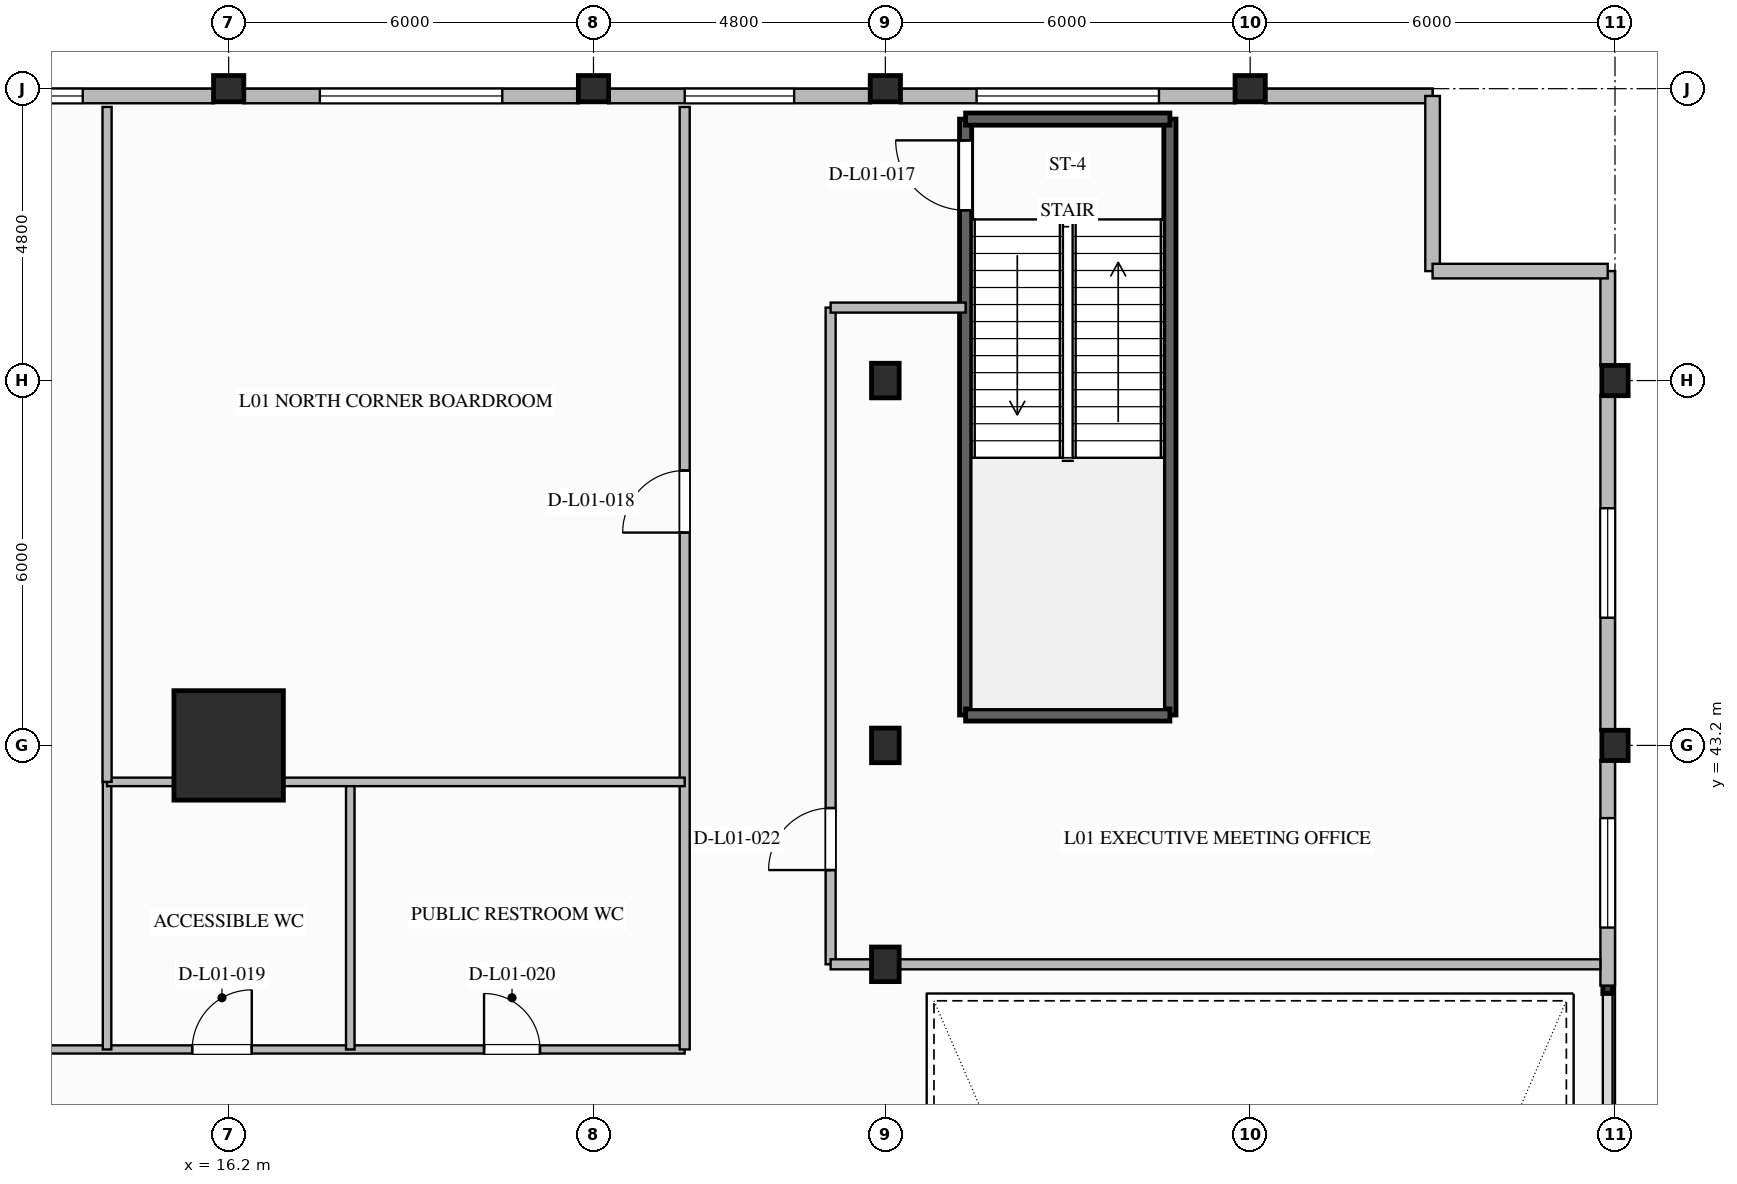
"""IFC4 building model, lengths in metres.
Left out: names, types, materials, properties, quantities, classifications, styles, units other than length and angle.
Written with IfcOpenShell. Run it as: python <this file> out.ifc"""

import sys

from ifc_helpers import new_model, si_unit, direction, frame, frame_2d, origin, origin_2d, place, context, subcontext, project, spatial, rectangle, i_section, extrude, element, fill, save


model = new_model("IFC4")
c1 = context("Model", 3, precision=1e-05, world=origin(), true_north=direction((0.0, 1.0)))
c2 = subcontext(c1, "Body", "Model", "MODEL_VIEW")
j1 = project(units=[si_unit("LENGTHUNIT", "METRE"), si_unit("PLANEANGLEUNIT", "RADIAN")], contexts=[c1])
p1 = place(None, origin())
s1 = spatial("IfcSite", under=j1, at=p1, CompositionType="ELEMENT")
p2 = place(p1, origin())
s2 = spatial("IfcBuilding", under=s1, at=p2, CompositionType="ELEMENT")
p3 = place(p2, frame((0.0, 0.0, 5.6)))
s3 = spatial("IfcBuildingStorey", under=s2, at=p3, CompositionType="ELEMENT", Elevation=5.6)
p4 = place(p3, frame((16.2, 43.2, 0.0), z_axis=(0.0, 0.0, 1.0), x_axis=(1.0, 0.0, 0.0)))
e1 = element("IfcColumn", 1, at=p4, inside=s3, PredefinedType="COLUMN", context=c2, shape_type="SweptSolid", body=[
    extrude(rectangle(XDim=1.8, YDim=1.8, at=origin_2d()), origin(), (0.0, 0.0, 1.0), 5.2),
])
for number, where, z_axis, x_axis in (
    (2, (39.0, 43.2, 0.0), (0.0, 0.0, 1.0), (1.0, 0.0, 0.0)),
    (3, (39.0, 49.2, 0.0), (0.0, 0.0, 1.0), (1.0, 0.0, 0.0)),
    (4, (16.2, 54.0, 0.0), (0.0, 0.0, 1.0), (0.0, 1.0, 0.0)),
    (5, (22.2, 54.0, 0.0), (0.0, 0.0, 1.0), (0.0, 1.0, 0.0)),
    (6, (27.0, 54.0, 0.0), (0.0, 0.0, 1.0), (0.0, 1.0, 0.0)),
    (7, (33.0, 54.0, 0.0), (0.0, 0.0, 1.0), (0.0, 1.0, 0.0)),
):
    element("IfcColumn", number, at=place(p3, frame(where, z_axis=z_axis, x_axis=x_axis)), inside=s3, PredefinedType="COLUMN", context=c2, shape_type="SweptSolid", body=[
        extrude(i_section(OverallWidth=0.432, OverallDepth=0.498, WebThickness=0.056, FlangeThickness=0.089, FilletRadius=0.03, at=origin_2d()), origin(), (0.0, 0.0, 1.0), 5.2),
    ])
for number, where, z_axis, x_axis in (
    (8, (27.0, 39.6, 0.0), (0.0, 0.0, 1.0), (1.0, 0.0, 0.0)),
    (9, (27.0, 43.2, 0.0), (0.0, 0.0, 1.0), (1.0, 0.0, 0.0)),
    (10, (27.0, 49.2, 0.0), (0.0, 0.0, 1.0), (1.0, 0.0, 0.0)),
):
    element("IfcColumn", number, at=place(p3, frame(where, z_axis=z_axis, x_axis=x_axis)), inside=s3, PredefinedType="COLUMN", context=c2, shape_type="SweptSolid", body=[
        extrude(i_section(OverallWidth=0.454, OverallDepth=0.569, WebThickness=0.078, FlangeThickness=0.125, FilletRadius=0.03, at=origin_2d()), origin(), (0.0, 0.0, 1.0), 5.2),
    ])
p5 = place(p3, frame((38.88, 42.959, 0.0), z_axis=(0.0, 0.0, 1.0), x_axis=(0.0, -1.0, 0.0)))
e11 = element("IfcWall", 11, at=p5, inside=s3, PredefinedType="STANDARD", context=c2, shape_type="SweptSolid", body=[
    extrude(rectangle(XDim=3.709, YDim=0.24, at=frame_2d((1.854, 0.0))), origin(), (0.0, 0.0, 1.0), 4.154),
])
p6 = place(p5, frame((0.955, 0.0, 0.85)))
e12 = element("IfcOpeningElement", 12, at=p6, cuts=e11, PredefinedType="OPENING", context=c2, shape_type="SweptSolid", body=[
    extrude(rectangle(XDim=1.8, YDim=2.2, at=frame_2d((0.9, 1.1))), frame((0.0, 0.13, 0.0), z_axis=(0.0, -1.0, 0.0), x_axis=(1.0, 0.0, 0.0)), (0.0, 0.0, 1.0), 0.26),
])
p7 = place(p3, frame((38.88, 48.959, 0.0), z_axis=(0.0, 0.0, 1.0), x_axis=(0.0, -1.0, 0.0)))
e13 = element("IfcWall", 13, at=p7, inside=s3, PredefinedType="STANDARD", context=c2, shape_type="SweptSolid", body=[
    extrude(rectangle(XDim=5.518, YDim=0.24, at=frame_2d((2.759, 0.0))), origin(), (0.0, 0.0, 1.0), 4.154),
])
p8 = place(p7, frame((1.859, 0.0, 0.85)))
e14 = element("IfcOpeningElement", 14, at=p8, cuts=e13, PredefinedType="OPENING", context=c2, shape_type="SweptSolid", body=[
    extrude(rectangle(XDim=1.8, YDim=2.2, at=frame_2d((0.9, 1.1))), frame((0.0, 0.13, 0.0), z_axis=(0.0, -1.0, 0.0), x_axis=(1.0, 0.0, 0.0)), (0.0, 0.0, 1.0), 0.26),
])
p9 = place(p3, frame((38.88, 51.0, 0.0), z_axis=(0.0, 0.0, 1.0), x_axis=(0.0, -1.0, 0.0)))
e15 = element("IfcWall", 15, at=p9, inside=s3, PredefinedType="STANDARD", context=c2, shape_type="SweptSolid", body=[
    extrude(rectangle(XDim=1.559, YDim=0.24, at=frame_2d((0.78, 0.0))), origin(), (0.0, 0.0, 1.0), 4.85),
])
p10 = place(p3, frame((8.641, 53.88, 0.0), z_axis=(0.0, 0.0, 1.0), x_axis=(1.0, 0.0, 0.0)))
e16 = element("IfcWall", 16, at=p10, inside=s3, PredefinedType="STANDARD", context=c2, shape_type="SweptSolid", body=[
    extrude(rectangle(XDim=7.318, YDim=0.24, at=frame_2d((3.659, 0.0))), origin(), (0.0, 0.0, 1.0), 4.154),
])
p11 = place(p10, frame((2.159, 0.0, 0.65)))
e17 = element("IfcOpeningElement", 17, at=p11, cuts=e16, PredefinedType="OPENING", context=c2, shape_type="SweptSolid", body=[
    extrude(rectangle(XDim=3.0, YDim=2.2, at=frame_2d((1.5, 1.1))), frame((0.0, 0.13, 0.0), z_axis=(0.0, -1.0, 0.0), x_axis=(1.0, 0.0, 0.0)), (0.0, 0.0, 1.0), 0.26),
])
p12 = place(p3, frame((16.441, 53.88, 0.0), z_axis=(0.0, 0.0, 1.0), x_axis=(1.0, 0.0, 0.0)))
e18 = element("IfcWall", 18, at=p12, inside=s3, PredefinedType="STANDARD", context=c2, shape_type="SweptSolid", body=[
    extrude(rectangle(XDim=5.518, YDim=0.24, at=frame_2d((2.759, 0.0))), origin(), (0.0, 0.0, 1.0), 4.154),
])
p13 = place(p12, frame((1.259, 0.0, 0.65)))
e19 = element("IfcOpeningElement", 19, at=p13, cuts=e18, PredefinedType="OPENING", context=c2, shape_type="SweptSolid", body=[
    extrude(rectangle(XDim=3.0, YDim=2.2, at=frame_2d((1.5, 1.1))), frame((0.0, 0.13, 0.0), z_axis=(0.0, -1.0, 0.0), x_axis=(1.0, 0.0, 0.0)), (0.0, 0.0, 1.0), 0.26),
])
p14 = place(p3, frame((22.441, 53.88, 0.0), z_axis=(0.0, 0.0, 1.0), x_axis=(1.0, 0.0, 0.0)))
e20 = element("IfcWall", 20, at=p14, inside=s3, PredefinedType="STANDARD", context=c2, shape_type="SweptSolid", body=[
    extrude(rectangle(XDim=4.318, YDim=0.24, at=frame_2d((2.159, 0.0))), origin(), (0.0, 0.0, 1.0), 4.154),
])
p15 = place(p14, frame((1.259, 0.0, 0.65)))
e21 = element("IfcOpeningElement", 21, at=p15, cuts=e20, PredefinedType="OPENING", context=c2, shape_type="SweptSolid", body=[
    extrude(rectangle(XDim=1.8, YDim=2.2, at=frame_2d((0.9, 1.1))), frame((0.0, 0.13, 0.0), z_axis=(0.0, -1.0, 0.0), x_axis=(1.0, 0.0, 0.0)), (0.0, 0.0, 1.0), 0.26),
])
p16 = place(p3, frame((27.241, 53.88, 0.0), z_axis=(0.0, 0.0, 1.0), x_axis=(1.0, 0.0, 0.0)))
e22 = element("IfcWall", 22, at=p16, inside=s3, PredefinedType="STANDARD", context=c2, shape_type="SweptSolid", body=[
    extrude(rectangle(XDim=5.518, YDim=0.24, at=frame_2d((2.759, 0.0))), origin(), (0.0, 0.0, 1.0), 4.154),
])
p17 = place(p16, frame((1.259, 0.0, 0.65)))
e23 = element("IfcOpeningElement", 23, at=p17, cuts=e22, PredefinedType="OPENING", context=c2, shape_type="SweptSolid", body=[
    extrude(rectangle(XDim=3.0, YDim=2.2, at=frame_2d((1.5, 1.1))), frame((0.0, 0.13, 0.0), z_axis=(0.0, -1.0, 0.0), x_axis=(1.0, 0.0, 0.0)), (0.0, 0.0, 1.0), 0.26),
])
p18 = place(p3, frame((33.241, 53.88, 0.0), z_axis=(0.0, 0.0, 1.0), x_axis=(1.0, 0.0, 0.0)))
e24 = element("IfcWall", 24, at=p18, inside=s3, PredefinedType="STANDARD", context=c2, shape_type="SweptSolid", body=[
    extrude(rectangle(XDim=2.759, YDim=0.24, at=frame_2d((1.379, 0.0))), origin(), (0.0, 0.0, 1.0), 4.85),
])
for number, where, z_axis, x_axis in (
    (25, (36.0, 53.88, 0.0), (0.0, 0.0, 1.0), (0.0, -1.0, 0.0)),
    (26, (36.0, 51.0, 0.0), (0.0, 0.0, 1.0), (1.0, 0.0, 0.0)),
):
    element("IfcWall", number, at=place(p3, frame(where, z_axis=z_axis, x_axis=x_axis)), inside=s3, PredefinedType="STANDARD", context=c2, shape_type="SweptSolid", body=[
        extrude(rectangle(XDim=2.88, YDim=0.24, at=frame_2d((1.44, 0.0))), origin(), (0.0, 0.0, 1.0), 4.85),
    ])
p19 = place(p3, frame((28.32, 43.7, 0.0), z_axis=(0.0, 0.0, 1.0), x_axis=(0.0, 1.0, 0.0)))
e27 = element("IfcWall", 27, at=p19, inside=s3, PredefinedType="SOLIDWALL", context=c2, shape_type="SweptSolid", body=[
    extrude(rectangle(XDim=9.8, YDim=0.2, at=frame_2d((4.9, 0.0))), origin(), (0.0, 0.0, 1.0), 4.85),
])
p20 = place(p19, frame((8.3, 0.0, 0.0)))
e28 = element("IfcOpeningElement", 28, at=p20, cuts=e27, PredefinedType="OPENING", context=c2, shape_type="SweptSolid", body=[
    extrude(rectangle(XDim=1.15, YDim=2.15, at=frame_2d((0.575, 1.075))), frame((0.0, 0.11, 0.0), z_axis=(0.0, -1.0, 0.0), x_axis=(1.0, 0.0, 0.0)), (0.0, 0.0, 1.0), 0.22),
])
p21 = place(p3, frame((31.68, 53.5, 0.0), z_axis=(0.0, 0.0, 1.0), x_axis=(0.0, -1.0, 0.0)))
e29 = element("IfcWall", 29, at=p21, inside=s3, PredefinedType="SOLIDWALL", context=c2, shape_type="SweptSolid", body=[
    extrude(rectangle(XDim=9.8, YDim=0.2, at=frame_2d((4.9, 0.0))), origin(), (0.0, 0.0, 1.0), 4.85),
])
for number, where, z_axis, x_axis in (
    (30, (28.32, 43.7, 0.0), (0.0, 0.0, 1.0), (1.0, 0.0, 0.0)),
    (31, (31.68, 53.5, 0.0), (0.0, 0.0, 1.0), (-1.0, 0.0, 0.0)),
):
    element("IfcWall", number, at=place(p3, frame(where, z_axis=z_axis, x_axis=x_axis)), inside=s3, PredefinedType="SOLIDWALL", context=c2, shape_type="SweptSolid", body=[
        extrude(rectangle(XDim=3.36, YDim=0.2, at=frame_2d((1.68, 0.0))), origin(), (0.0, 0.0, 1.0), 4.85),
    ])
p22 = place(p3, frame((-23.6, 38.2, 0.0), z_axis=(0.0, 0.0, 1.0), x_axis=(1.0, 0.0, 0.0)))
e32 = element("IfcWall", 32, at=p22, inside=s3, PredefinedType="PARTITIONING", context=c2, shape_type="SweptSolid", body=[
    extrude(rectangle(XDim=47.3, YDim=0.135, at=frame_2d((23.65, 0.0))), origin(), (0.0, 0.0, 1.0), 4.85),
])
p23 = place(p22, frame((39.2, 0.0, 0.0)))
e33 = element("IfcOpeningElement", 33, at=p23, cuts=e32, PredefinedType="OPENING", context=c2, shape_type="SweptSolid", body=[
    extrude(rectangle(XDim=0.98, YDim=2.1, at=frame_2d((0.49, 1.05))), frame((0.0, 0.077, 0.0), z_axis=(0.0, -1.0, 0.0), x_axis=(1.0, 0.0, 0.0)), (0.0, 0.0, 1.0), 0.155),
])
p24 = place(p22, frame((44.0, 0.0, 0.0)))
e34 = element("IfcOpeningElement", 34, at=p24, cuts=e32, PredefinedType="OPENING", context=c2, shape_type="SweptSolid", body=[
    extrude(rectangle(XDim=0.92, YDim=2.1, at=frame_2d((0.46, 1.05))), frame((0.0, 0.077, 0.0), z_axis=(0.0, -1.0, 0.0), x_axis=(1.0, 0.0, 0.0)), (0.0, 0.0, 1.0), 0.155),
])
p25 = place(p22, frame((12.0, 0.0, 0.0)))
e35 = element("IfcOpeningElement", 35, at=p25, cuts=e32, PredefinedType="OPENING", context=c2, shape_type="SweptSolid", body=[
    extrude(rectangle(XDim=1.36, YDim=2.2, at=frame_2d((0.68, 1.1))), frame((0.0, 0.077, 0.0), z_axis=(0.0, -1.0, 0.0), x_axis=(1.0, 0.0, 0.0)), (0.0, 0.0, 1.0), 0.155),
])
p26 = place(p22, frame((28.0, 0.0, 0.0)))
e36 = element("IfcOpeningElement", 36, at=p26, cuts=e32, PredefinedType="OPENING", context=c2, shape_type="SweptSolid", body=[
    extrude(rectangle(XDim=1.26, YDim=2.2, at=frame_2d((0.63, 1.1))), frame((0.0, 0.077, 0.0), z_axis=(0.0, -1.0, 0.0), x_axis=(1.0, 0.0, 0.0)), (0.0, 0.0, 1.0), 0.155),
])
p27 = place(p3, frame((23.7, 38.2, 0.0), z_axis=(0.0, 0.0, 1.0), x_axis=(0.0, 1.0, 0.0)))
e37 = element("IfcWall", 37, at=p27, inside=s3, PredefinedType="PARTITIONING", context=c2, shape_type="SweptSolid", body=[
    extrude(rectangle(XDim=15.5, YDim=0.165, at=frame_2d((7.75, 0.0))), origin(), (0.0, 0.0, 1.0), 4.85),
])
p28 = place(p27, frame((8.5, 0.0, 0.0)))
e38 = element("IfcOpeningElement", 38, at=p28, cuts=e37, PredefinedType="OPENING", context=c2, shape_type="SweptSolid", body=[
    extrude(rectangle(XDim=1.02, YDim=2.15, at=frame_2d((0.51, 1.075))), frame((0.0, 0.093, 0.0), z_axis=(0.0, -1.0, 0.0), x_axis=(1.0, 0.0, 0.0)), (0.0, 0.0, 1.0), 0.185),
])
p29 = place(p3, frame((26.1, 39.6, 0.0), z_axis=(0.0, 0.0, 1.0), x_axis=(0.0, 1.0, 0.0)))
e39 = element("IfcWall", 39, at=p29, inside=s3, PredefinedType="PARTITIONING", context=c2, shape_type="SweptSolid", body=[
    extrude(rectangle(XDim=10.8, YDim=0.165, at=frame_2d((5.4, 0.0))), origin(), (0.0, 0.0, 1.0), 4.85),
])
p30 = place(p29, frame((1.55, 0.0, 0.0)))
e40 = element("IfcOpeningElement", 40, at=p30, cuts=e39, PredefinedType="OPENING", context=c2, shape_type="SweptSolid", body=[
    extrude(rectangle(XDim=1.02, YDim=2.15, at=frame_2d((0.51, 1.075))), frame((0.0, 0.093, 0.0), z_axis=(0.0, -1.0, 0.0), x_axis=(1.0, 0.0, 0.0)), (0.0, 0.0, 1.0), 0.185),
])
p31 = place(p3, frame((26.1, 50.4, 0.0), z_axis=(0.0, 0.0, 1.0), x_axis=(1.0, 0.0, 0.0)))
e41 = element("IfcWall", 41, at=p31, inside=s3, PredefinedType="PARTITIONING", context=c2, shape_type="SweptSolid", body=[
    extrude(rectangle(XDim=2.22, YDim=0.165, at=frame_2d((1.11, 0.0))), origin(), (0.0, 0.0, 1.0), 4.85),
])
p32 = place(p3, frame((26.1, 39.6, 0.0), z_axis=(0.0, 0.0, 1.0), x_axis=(1.0, 0.0, 0.0)))
e42 = element("IfcWall", 42, at=p32, inside=s3, PredefinedType="PARTITIONING", context=c2, shape_type="SweptSolid", body=[
    extrude(rectangle(XDim=12.66, YDim=0.165, at=frame_2d((6.33, 0.0))), origin(), (0.0, 0.0, 1.0), 4.375),
])
for number, where, z_axis, x_axis in (
    (43, (14.2, 38.2, 0.0), (0.0, 0.0, 1.0), (0.0, 1.0, 0.0)),
    (44, (18.2, 38.2, 0.0), (0.0, 0.0, 1.0), (0.0, 1.0, 0.0)),
):
    element("IfcWall", number, at=place(p3, frame(where, z_axis=z_axis, x_axis=x_axis)), inside=s3, PredefinedType="PLUMBINGWALL", context=c2, shape_type="SweptSolid", body=[
        extrude(rectangle(XDim=4.4, YDim=0.14, at=frame_2d((2.2, 0.0))), origin(), (0.0, 0.0, 1.0), 4.85),
    ])
p33 = place(p3, frame((14.2, 42.6, 0.0), z_axis=(0.0, 0.0, 1.0), x_axis=(1.0, 0.0, 0.0)))
e45 = element("IfcWall", 45, at=p33, inside=s3, PredefinedType="PLUMBINGWALL", context=c2, shape_type="SweptSolid", body=[
    extrude(rectangle(XDim=9.5, YDim=0.14, at=frame_2d((4.75, 0.0))), origin(), (0.0, 0.0, 1.0), 4.85),
])
p34 = place(p3, frame((14.2, 42.6, 0.0), z_axis=(0.0, 0.0, 1.0), x_axis=(0.0, 1.0, 0.0)))
e46 = element("IfcWall", 46, at=p34, inside=s3, PredefinedType="PARTITIONING", context=c2, shape_type="SweptSolid", body=[
    extrude(rectangle(XDim=11.1, YDim=0.15, at=frame_2d((5.55, 0.0))), origin(), (0.0, 0.0, 1.0), 4.85),
])
p35 = place(p6, origin())
e47 = element("IfcWindow", 47, at=p35, inside=s3, PartitioningType="SINGLE_PANEL", PredefinedType="WINDOW", context=c2, shape_type="SweptSolid", body=[
    extrude(rectangle(XDim=1.8, YDim=2.2, at=frame_2d((0.9, 1.1))), frame((0.0, 0.03, 0.0), z_axis=(0.0, -1.0, 0.0), x_axis=(1.0, 0.0, 0.0)), (0.0, 0.0, 1.0), 0.06),
])
fill(e12, e47)
p36 = place(p8, origin())
e48 = element("IfcWindow", 48, at=p36, inside=s3, PartitioningType="SINGLE_PANEL", PredefinedType="WINDOW", context=c2, shape_type="SweptSolid", body=[
    extrude(rectangle(XDim=1.8, YDim=2.2, at=frame_2d((0.9, 1.1))), frame((0.0, 0.03, 0.0), z_axis=(0.0, -1.0, 0.0), x_axis=(1.0, 0.0, 0.0)), (0.0, 0.0, 1.0), 0.06),
])
fill(e14, e48)
p37 = place(p11, origin())
e49 = element("IfcWindow", 49, at=p37, inside=s3, PartitioningType="SINGLE_PANEL", PredefinedType="WINDOW", context=c2, shape_type="SweptSolid", body=[
    extrude(rectangle(XDim=3.0, YDim=2.2, at=frame_2d((1.5, 1.1))), frame((0.0, 0.03, 0.0), z_axis=(0.0, -1.0, 0.0), x_axis=(1.0, 0.0, 0.0)), (0.0, 0.0, 1.0), 0.06),
])
fill(e17, e49)
p38 = place(p13, origin())
e50 = element("IfcWindow", 50, at=p38, inside=s3, PartitioningType="SINGLE_PANEL", PredefinedType="WINDOW", context=c2, shape_type="SweptSolid", body=[
    extrude(rectangle(XDim=3.0, YDim=2.2, at=frame_2d((1.5, 1.1))), frame((0.0, 0.03, 0.0), z_axis=(0.0, -1.0, 0.0), x_axis=(1.0, 0.0, 0.0)), (0.0, 0.0, 1.0), 0.06),
])
fill(e19, e50)
p39 = place(p15, origin())
e51 = element("IfcWindow", 51, at=p39, inside=s3, PartitioningType="SINGLE_PANEL", PredefinedType="WINDOW", context=c2, shape_type="SweptSolid", body=[
    extrude(rectangle(XDim=1.8, YDim=2.2, at=frame_2d((0.9, 1.1))), frame((0.0, 0.03, 0.0), z_axis=(0.0, -1.0, 0.0), x_axis=(1.0, 0.0, 0.0)), (0.0, 0.0, 1.0), 0.06),
])
fill(e21, e51)
p40 = place(p17, origin())
e52 = element("IfcWindow", 52, at=p40, inside=s3, PartitioningType="SINGLE_PANEL", PredefinedType="WINDOW", context=c2, shape_type="SweptSolid", body=[
    extrude(rectangle(XDim=3.0, YDim=2.2, at=frame_2d((1.5, 1.1))), frame((0.0, 0.03, 0.0), z_axis=(0.0, -1.0, 0.0), x_axis=(1.0, 0.0, 0.0)), (0.0, 0.0, 1.0), 0.06),
])
fill(e23, e52)
p41 = place(p20, origin())
e53 = element("IfcDoor", 53, at=p41, inside=s3, OperationType="SINGLE_SWING_RIGHT", PredefinedType="DOOR", context=c2, shape_type="SweptSolid", body=[
    extrude(rectangle(XDim=1.15, YDim=2.15, at=frame_2d((0.575, 1.075))), frame((0.0, 0.025, 0.0), z_axis=(0.0, -1.0, 0.0), x_axis=(1.0, 0.0, 0.0)), (0.0, 0.0, 1.0), 0.05),
])
fill(e28, e53)
p42 = place(p28, origin())
e54 = element("IfcDoor", 54, at=p42, inside=s3, OperationType="SINGLE_SWING_LEFT", PredefinedType="DOOR", context=c2, shape_type="SweptSolid", body=[
    extrude(rectangle(XDim=1.02, YDim=2.15, at=frame_2d((0.51, 1.075))), frame((0.0, 0.025, 0.0), z_axis=(0.0, -1.0, 0.0), x_axis=(1.0, 0.0, 0.0)), (0.0, 0.0, 1.0), 0.05),
])
fill(e38, e54)
p43 = place(p23, origin())
e55 = element("IfcDoor", 55, at=p43, inside=s3, OperationType="SINGLE_SWING_RIGHT", PredefinedType="DOOR", context=c2, shape_type="SweptSolid", body=[
    extrude(rectangle(XDim=0.98, YDim=2.1, at=frame_2d((0.49, 1.05))), frame((0.0, 0.025, 0.0), z_axis=(0.0, -1.0, 0.0), x_axis=(1.0, 0.0, 0.0)), (0.0, 0.0, 1.0), 0.05),
])
fill(e33, e55)
p44 = place(p24, origin())
e56 = element("IfcDoor", 56, at=p44, inside=s3, OperationType="SINGLE_SWING_LEFT", PredefinedType="DOOR", context=c2, shape_type="SweptSolid", body=[
    extrude(rectangle(XDim=0.92, YDim=2.1, at=frame_2d((0.46, 1.05))), frame((0.0, 0.025, 0.0), z_axis=(0.0, -1.0, 0.0), x_axis=(1.0, 0.0, 0.0)), (0.0, 0.0, 1.0), 0.05),
])
fill(e34, e56)
p45 = place(p30, origin())
e57 = element("IfcDoor", 57, at=p45, inside=s3, OperationType="SINGLE_SWING_LEFT", PredefinedType="DOOR", context=c2, shape_type="SweptSolid", body=[
    extrude(rectangle(XDim=1.02, YDim=2.15, at=frame_2d((0.51, 1.075))), frame((0.0, 0.025, 0.0), z_axis=(0.0, -1.0, 0.0), x_axis=(1.0, 0.0, 0.0)), (0.0, 0.0, 1.0), 0.05),
])
fill(e40, e57)
save(model, sys.argv[1])
